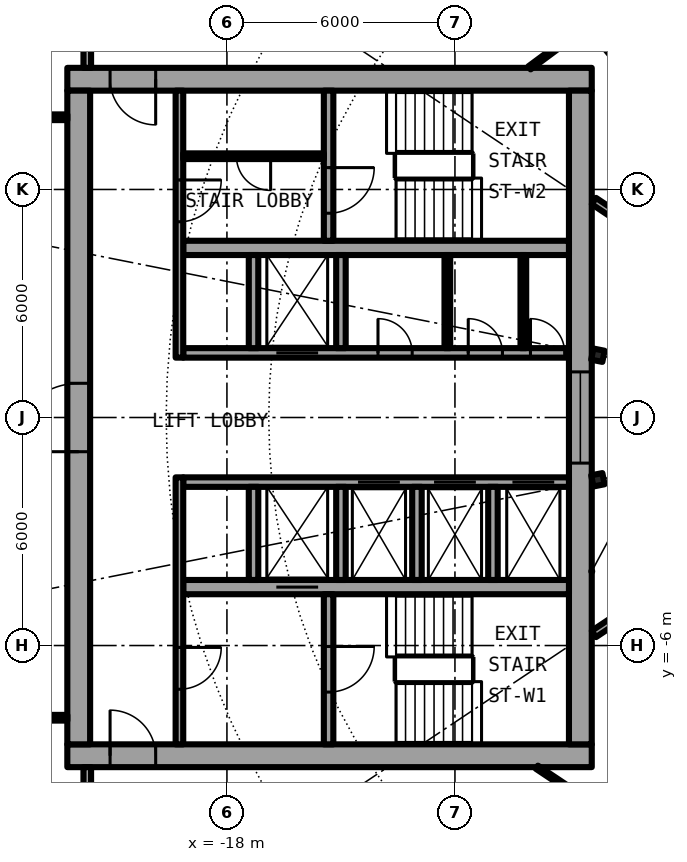
"""IFC4 building model, lengths in metres.
Left out: names, types, materials, properties, quantities, classifications, styles, units other than length and angle.
Written with IfcOpenShell. Run it as: python <this file> out.ifc"""

import sys

from ifc_helpers import new_model, si_unit, direction, frame, frame_2d, origin, origin_2d, place, context, subcontext, project, spatial, rectangle, i_section, extrude, element, fill, save


model = new_model("IFC4")
c1 = context("Model", 3, precision=1e-05, world=origin(), true_north=direction((0.0, 1.0)))
c2 = subcontext(c1, "Body", "Model", "MODEL_VIEW")
j1 = project(units=[si_unit("LENGTHUNIT", "METRE"), si_unit("PLANEANGLEUNIT", "RADIAN")], contexts=[c1])
p1 = place(None, origin())
s1 = spatial("IfcSite", under=j1, at=p1, CompositionType="ELEMENT")
p2 = place(p1, origin())
s2 = spatial("IfcBuilding", under=s1, at=p2, CompositionType="ELEMENT")
p3 = place(p2, frame((0.0, 0.0, 123.85)))
s3 = spatial("IfcBuildingStorey", under=s2, at=p3, CompositionType="ELEMENT", Elevation=123.85)
for number, where, z_axis, x_axis in (
    (1, (-8.239, 1.639, 0.0), (0.0, 0.0, 1.0), (-0.981, 0.195, 0.0)),
    (2, (-8.239, -1.639, 0.0), (0.0, 0.0, 1.0), (-0.981, -0.195, 0.0)),
):
    element("IfcColumn", number, at=place(p3, frame(where, z_axis=z_axis, x_axis=x_axis)), inside=s3, PredefinedType="COLUMN", context=c2, shape_type="SweptSolid", body=[
        extrude(i_section(OverallWidth=0.3, OverallDepth=0.3, WebThickness=0.011, FlangeThickness=0.019, FilletRadius=0.027, at=origin_2d()), origin(), (0.0, 0.0, 1.0), 3.05),
    ])
p4 = place(p3, frame((-22.2, -8.9, 0.0), z_axis=(0.0, 0.0, 1.0), x_axis=(1.0, 0.0, 0.0)))
e3 = element("IfcWall", 3, at=p4, inside=s3, PredefinedType="SHEAR", context=c2, shape_type="SweptSolid", body=[
    extrude(rectangle(XDim=13.8, YDim=0.6, at=frame_2d((6.9, 0.0))), origin(), (0.0, 0.0, 1.0), 3.05),
])
p5 = place(p4, frame((1.125, 0.0, 0.0)))
e4 = element("IfcOpeningElement", 4, at=p5, cuts=e3, PredefinedType="OPENING", context=c2, shape_type="SweptSolid", body=[
    extrude(rectangle(XDim=1.2, YDim=2.3, at=frame_2d((0.6, 1.15))), frame((0.0, 0.31, 0.0), z_axis=(0.0, -1.0, 0.0), x_axis=(1.0, 0.0, 0.0)), (0.0, 0.0, 1.0), 0.62),
])
p6 = place(p3, frame((-8.4, 8.9, 0.0), z_axis=(0.0, 0.0, 1.0), x_axis=(-1.0, 0.0, 0.0)))
e5 = element("IfcWall", 5, at=p6, inside=s3, PredefinedType="SHEAR", context=c2, shape_type="SweptSolid", body=[
    extrude(rectangle(XDim=13.8, YDim=0.6, at=frame_2d((6.9, 0.0))), origin(), (0.0, 0.0, 1.0), 3.05),
])
p7 = place(p6, frame((11.475, 0.0, 0.0)))
e6 = element("IfcOpeningElement", 6, at=p7, cuts=e5, PredefinedType="OPENING", context=c2, shape_type="SweptSolid", body=[
    extrude(rectangle(XDim=1.2, YDim=2.3, at=frame_2d((0.6, 1.15))), frame((0.0, 0.31, 0.0), z_axis=(0.0, -1.0, 0.0), x_axis=(1.0, 0.0, 0.0)), (0.0, 0.0, 1.0), 0.62),
])
p8 = place(p3, frame((-21.9, -8.6, 0.0), z_axis=(0.0, 0.0, 1.0), x_axis=(0.0, 1.0, 0.0)))
e7 = element("IfcWall", 7, at=p8, inside=s3, PredefinedType="SHEAR", context=c2, shape_type="SweptSolid", body=[
    extrude(rectangle(XDim=17.2, YDim=0.6, at=frame_2d((8.6, 0.0))), origin(), (0.0, 0.0, 1.0), 3.05),
])
p9 = place(p8, frame((7.7, 0.0, 0.0)))
e8 = element("IfcOpeningElement", 8, at=p9, cuts=e7, PredefinedType="OPENING", context=c2, shape_type="SweptSolid", body=[
    extrude(rectangle(XDim=1.8, YDim=2.3, at=frame_2d((0.9, 1.15))), frame((0.0, 0.31, 0.0), z_axis=(0.0, -1.0, 0.0), x_axis=(1.0, 0.0, 0.0)), (0.0, 0.0, 1.0), 0.62),
])
p10 = place(p3, frame((-8.7, 8.6, 0.0), z_axis=(0.0, 0.0, 1.0), x_axis=(0.0, -1.0, 0.0)))
e9 = element("IfcWall", 9, at=p10, inside=s3, PredefinedType="SHEAR", context=c2, shape_type="SweptSolid", body=[
    extrude(rectangle(XDim=17.2, YDim=0.6, at=frame_2d((8.6, 0.0))), origin(), (0.0, 0.0, 1.0), 3.05),
])
p11 = place(p10, frame((7.4, 0.0, 0.1)))
e10 = element("IfcOpeningElement", 10, at=p11, cuts=e9, PredefinedType="OPENING", context=c2, shape_type="SweptSolid", body=[
    extrude(rectangle(XDim=2.4, YDim=2.2, at=frame_2d((1.2, 1.1))), frame((0.0, 0.31, 0.0), z_axis=(0.0, -1.0, 0.0), x_axis=(1.0, 0.0, 0.0)), (0.0, 0.0, 1.0), 0.62),
])
p12 = place(p3, frame((-9.0, -1.7, 0.0), z_axis=(0.0, 0.0, 1.0), x_axis=(-1.0, 0.0, 0.0)))
e11 = element("IfcWall", 11, at=p12, inside=s3, PredefinedType="SHEAR", context=c2, shape_type="SweptSolid", body=[
    extrude(rectangle(XDim=10.15, YDim=0.25, at=frame_2d((5.075, 0.0))), origin(), (0.0, 0.0, 1.0), 3.05),
])
p13 = place(p12, frame((0.387, 0.0, 0.0)))
e12 = element("IfcOpeningElement", 12, at=p13, cuts=e11, PredefinedType="OPENING", context=c2, shape_type="SweptSolid", body=[
    extrude(rectangle(XDim=1.1, YDim=2.3, at=frame_2d((0.55, 1.15))), frame((0.0, 0.135, 0.0), z_axis=(0.0, -1.0, 0.0), x_axis=(1.0, 0.0, 0.0)), (0.0, 0.0, 1.0), 0.27),
])
p14 = place(p12, frame((2.45, 0.0, 0.0)))
e13 = element("IfcOpeningElement", 13, at=p14, cuts=e11, PredefinedType="OPENING", context=c2, shape_type="SweptSolid", body=[
    extrude(rectangle(XDim=1.1, YDim=2.3, at=frame_2d((0.55, 1.15))), frame((0.0, 0.135, 0.0), z_axis=(0.0, -1.0, 0.0), x_axis=(1.0, 0.0, 0.0)), (0.0, 0.0, 1.0), 0.27),
])
p15 = place(p12, frame((4.45, 0.0, 0.0)))
e14 = element("IfcOpeningElement", 14, at=p15, cuts=e11, PredefinedType="OPENING", context=c2, shape_type="SweptSolid", body=[
    extrude(rectangle(XDim=1.1, YDim=2.3, at=frame_2d((0.55, 1.15))), frame((0.0, 0.135, 0.0), z_axis=(0.0, -1.0, 0.0), x_axis=(1.0, 0.0, 0.0)), (0.0, 0.0, 1.0), 0.27),
])
p16 = place(p3, frame((-9.0, -4.462, 0.0), z_axis=(0.0, 0.0, 1.0), x_axis=(-1.0, 0.0, 0.0)))
e15 = element("IfcWall", 15, at=p16, inside=s3, PredefinedType="SHEAR", context=c2, shape_type="SweptSolid", body=[
    extrude(rectangle(XDim=10.15, YDim=0.375, at=frame_2d((5.075, 0.0))), origin(), (0.0, 0.0, 1.0), 3.05),
])
p17 = place(p16, frame((6.6, 0.0, 0.0)))
e16 = element("IfcOpeningElement", 16, at=p17, cuts=e15, PredefinedType="OPENING", context=c2, shape_type="SweptSolid", body=[
    extrude(rectangle(XDim=1.1, YDim=2.3, at=frame_2d((0.55, 1.15))), frame((0.0, 0.198, 0.0), z_axis=(0.0, -1.0, 0.0), x_axis=(1.0, 0.0, 0.0)), (0.0, 0.0, 1.0), 0.395),
])
p18 = place(p3, frame((-15.325, -4.65, 0.0), z_axis=(0.0, 0.0, 1.0), x_axis=(0.0, -1.0, 0.0)))
e17 = element("IfcWall", 17, at=p18, inside=s3, PredefinedType="SHEAR", context=c2, shape_type="SweptSolid", body=[
    extrude(rectangle(XDim=3.95, YDim=0.25, at=frame_2d((1.975, 0.0))), origin(), (0.0, 0.0, 1.0), 3.05),
])
p19 = place(p18, frame((1.375, 0.0, 0.0)))
e18 = element("IfcOpeningElement", 18, at=p19, cuts=e17, PredefinedType="OPENING", context=c2, shape_type="SweptSolid", body=[
    extrude(rectangle(XDim=1.2, YDim=2.3, at=frame_2d((0.6, 1.15))), frame((0.0, 0.135, 0.0), z_axis=(0.0, -1.0, 0.0), x_axis=(1.0, 0.0, 0.0)), (0.0, 0.0, 1.0), 0.27),
])
for number, where, z_axis, x_axis in (
    (19, (-15.0, -1.825, 0.0), (0.0, 0.0, 1.0), (0.0, -1.0, 0.0)),
    (20, (-17.3, -1.825, 0.0), (0.0, 0.0, 1.0), (0.0, -1.0, 0.0)),
):
    element("IfcWall", number, at=place(p3, frame(where, z_axis=z_axis, x_axis=x_axis)), inside=s3, PredefinedType="SOLIDWALL", context=c2, shape_type="SweptSolid", body=[
        extrude(rectangle(XDim=2.45, YDim=0.25, at=frame_2d((1.225, 0.0))), origin(), (0.0, 0.0, 1.0), 2.7),
    ])
p20 = place(p3, frame((-19.25, -1.575, 0.0), z_axis=(0.0, 0.0, 1.0), x_axis=(0.0, -1.0, 0.0)))
e21 = element("IfcWall", 21, at=p20, inside=s3, PredefinedType="SOLIDWALL", context=c2, shape_type="SweptSolid", body=[
    extrude(rectangle(XDim=7.025, YDim=0.2, at=frame_2d((3.513, 0.0))), origin(), (0.0, 0.0, 1.0), 2.7),
])
p21 = place(p20, frame((4.475, 0.0, 0.0)))
e22 = element("IfcOpeningElement", 22, at=p21, cuts=e21, PredefinedType="OPENING", context=c2, shape_type="SweptSolid", body=[
    extrude(rectangle(XDim=1.1, YDim=2.3, at=frame_2d((0.55, 1.15))), frame((0.0, 0.11, 0.0), z_axis=(0.0, -1.0, 0.0), x_axis=(1.0, 0.0, 0.0)), (0.0, 0.0, 1.0), 0.22),
])
p22 = place(p3, frame((-19.15, 1.7, 0.0), z_axis=(0.0, 0.0, 1.0), x_axis=(1.0, 0.0, 0.0)))
e23 = element("IfcWall", 23, at=p22, inside=s3, PredefinedType="SHEAR", context=c2, shape_type="SweptSolid", body=[
    extrude(rectangle(XDim=10.15, YDim=0.25, at=frame_2d((5.075, 0.0))), origin(), (0.0, 0.0, 1.0), 3.05),
])
p23 = place(p22, frame((2.45, 0.0, 0.0)))
e24 = element("IfcOpeningElement", 24, at=p23, cuts=e23, PredefinedType="OPENING", context=c2, shape_type="SweptSolid", body=[
    extrude(rectangle(XDim=1.1, YDim=2.3, at=frame_2d((0.55, 1.15))), frame((0.0, 0.135, 0.0), z_axis=(0.0, -1.0, 0.0), x_axis=(1.0, 0.0, 0.0)), (0.0, 0.0, 1.0), 0.27),
])
p24 = place(p22, frame((9.137, 0.0, 0.0)))
e25 = element("IfcOpeningElement", 25, at=p24, cuts=e23, PredefinedType="OPENING", context=c2, shape_type="SweptSolid", body=[
    extrude(rectangle(XDim=0.9, YDim=2.3, at=frame_2d((0.45, 1.15))), frame((0.0, 0.135, 0.0), z_axis=(0.0, -1.0, 0.0), x_axis=(1.0, 0.0, 0.0)), (0.0, 0.0, 1.0), 0.27),
])
p25 = place(p22, frame((7.5, 0.0, 0.0)))
e26 = element("IfcOpeningElement", 26, at=p25, cuts=e23, PredefinedType="OPENING", context=c2, shape_type="SweptSolid", body=[
    extrude(rectangle(XDim=0.9, YDim=2.3, at=frame_2d((0.45, 1.15))), frame((0.0, 0.135, 0.0), z_axis=(0.0, -1.0, 0.0), x_axis=(1.0, 0.0, 0.0)), (0.0, 0.0, 1.0), 0.27),
])
p26 = place(p22, frame((5.125, 0.0, 0.0)))
e27 = element("IfcOpeningElement", 27, at=p26, cuts=e23, PredefinedType="OPENING", context=c2, shape_type="SweptSolid", body=[
    extrude(rectangle(XDim=0.9, YDim=2.3, at=frame_2d((0.45, 1.15))), frame((0.0, 0.135, 0.0), z_axis=(0.0, -1.0, 0.0), x_axis=(1.0, 0.0, 0.0)), (0.0, 0.0, 1.0), 0.27),
])
p27 = place(p3, frame((-9.0, 4.462, 0.0), z_axis=(0.0, 0.0, 1.0), x_axis=(-1.0, 0.0, 0.0)))
e28 = element("IfcWall", 28, at=p27, inside=s3, PredefinedType="SHEAR", context=c2, shape_type="SweptSolid", body=[
    extrude(rectangle(XDim=10.15, YDim=0.375, at=frame_2d((5.075, 0.0))), origin(), (0.0, 0.0, 1.0), 3.05),
])
p28 = place(p3, frame((-15.325, 8.6, 0.0), z_axis=(0.0, 0.0, 1.0), x_axis=(0.0, -1.0, 0.0)))
e29 = element("IfcWall", 29, at=p28, inside=s3, PredefinedType="SHEAR", context=c2, shape_type="SweptSolid", body=[
    extrude(rectangle(XDim=3.95, YDim=0.25, at=frame_2d((1.975, 0.0))), origin(), (0.0, 0.0, 1.0), 3.05),
])
p29 = place(p28, frame((2.025, 0.0, 0.0)))
e30 = element("IfcOpeningElement", 30, at=p29, cuts=e29, PredefinedType="OPENING", context=c2, shape_type="SweptSolid", body=[
    extrude(rectangle(XDim=1.2, YDim=2.3, at=frame_2d((0.6, 1.15))), frame((0.0, 0.135, 0.0), z_axis=(0.0, -1.0, 0.0), x_axis=(1.0, 0.0, 0.0)), (0.0, 0.0, 1.0), 0.27),
])
for number, where, z_axis, x_axis in (
    (31, (-15.0, 1.825, 0.0), (0.0, 0.0, 1.0), (0.0, 1.0, 0.0)),
    (32, (-17.3, 1.825, 0.0), (0.0, 0.0, 1.0), (0.0, 1.0, 0.0)),
):
    element("IfcWall", number, at=place(p3, frame(where, z_axis=z_axis, x_axis=x_axis)), inside=s3, PredefinedType="SOLIDWALL", context=c2, shape_type="SweptSolid", body=[
        extrude(rectangle(XDim=2.45, YDim=0.25, at=frame_2d((1.225, 0.0))), origin(), (0.0, 0.0, 1.0), 2.7),
    ])
p30 = place(p3, frame((-19.25, 8.6, 0.0), z_axis=(0.0, 0.0, 1.0), x_axis=(0.0, -1.0, 0.0)))
e33 = element("IfcWall", 33, at=p30, inside=s3, PredefinedType="SOLIDWALL", context=c2, shape_type="SweptSolid", body=[
    extrude(rectangle(XDim=7.025, YDim=0.2, at=frame_2d((3.513, 0.0))), origin(), (0.0, 0.0, 1.0), 2.7),
])
p31 = place(p30, frame((2.35, 0.0, 0.0)))
e34 = element("IfcOpeningElement", 34, at=p31, cuts=e33, PredefinedType="OPENING", context=c2, shape_type="SweptSolid", body=[
    extrude(rectangle(XDim=1.1, YDim=2.3, at=frame_2d((0.55, 1.15))), frame((0.0, 0.11, 0.0), z_axis=(0.0, -1.0, 0.0), x_axis=(1.0, 0.0, 0.0)), (0.0, 0.0, 1.0), 0.22),
])
for number, where, z_axis, x_axis in (
    (35, (-11.0, -1.825, 0.0), (0.0, 0.0, 1.0), (0.0, -1.0, 0.0)),
    (36, (-13.0, -1.825, 0.0), (0.0, 0.0, 1.0), (0.0, -1.0, 0.0)),
):
    element("IfcWall", number, at=place(p3, frame(where, z_axis=z_axis, x_axis=x_axis)), inside=s3, PredefinedType="SOLIDWALL", context=c2, shape_type="SweptSolid", body=[
        extrude(rectangle(XDim=2.45, YDim=0.25, at=frame_2d((1.225, 0.0))), origin(), (0.0, 0.0, 1.0), 2.7),
    ])
for number, where, z_axis, x_axis in (
    (37, (-10.2, 1.825, 0.0), (0.0, 0.0, 1.0), (0.0, 1.0, 0.0)),
    (38, (-12.2, 1.825, 0.0), (0.0, 0.0, 1.0), (0.0, 1.0, 0.0)),
):
    element("IfcWall", number, at=place(p3, frame(where, z_axis=z_axis, x_axis=x_axis)), inside=s3, PredefinedType="PARTITIONING", context=c2, shape_type="SweptSolid", body=[
        extrude(rectangle(XDim=2.45, YDim=0.15, at=frame_2d((1.225, 0.0))), origin(), (0.0, 0.0, 1.0), 2.7),
    ])
p32 = place(p3, frame((-15.45, 6.875, 0.0), z_axis=(0.0, 0.0, 1.0), x_axis=(-1.0, 0.0, 0.0)))
e39 = element("IfcWall", 39, at=p32, inside=s3, PredefinedType="PARTITIONING", context=c2, shape_type="SweptSolid", body=[
    extrude(rectangle(XDim=3.7, YDim=0.15, at=frame_2d((1.85, 0.0))), origin(), (0.0, 0.0, 1.0), 2.7),
])
p33 = place(p32, frame((1.4, 0.0, 0.0)))
e40 = element("IfcOpeningElement", 40, at=p33, cuts=e39, PredefinedType="OPENING", context=c2, shape_type="SweptSolid", body=[
    extrude(rectangle(XDim=0.9, YDim=2.3, at=frame_2d((0.45, 1.15))), frame((0.0, 0.085, 0.0), z_axis=(0.0, -1.0, 0.0), x_axis=(1.0, 0.0, 0.0)), (0.0, 0.0, 1.0), 0.17),
])
for number, where, z_axis, x_axis in (
    (41, (-22.2, 7.9, 0.0), (0.0, 0.0, 1.0), (-1.0, 0.0, 0.0)),
    (42, (-22.2, -7.9, 0.0), (0.0, 0.0, 1.0), (-1.0, 0.0, 0.0)),
):
    element("IfcWall", number, at=place(p3, frame(where, z_axis=z_axis, x_axis=x_axis)), inside=s3, PredefinedType="PARTITIONING", context=c2, shape_type="SweptSolid", body=[
        extrude(rectangle(XDim=2.74, YDim=0.15, at=frame_2d((1.37, 0.0))), origin(), (0.0, 0.0, 1.0), 2.7),
    ])
p34 = place(p3, frame((-9.844, -9.202, 0.0), z_axis=(0.0, 0.0, 1.0), x_axis=(0.831617979783, -0.555348121183, 0.0)))
e43 = element("IfcWall", 43, at=p34, inside=s3, PredefinedType="PARTITIONING", context=c2, shape_type="SweptSolid", body=[
    extrude(rectangle(XDim=4.434, YDim=0.1, at=frame_2d((2.217, 0.0))), origin(), (0.0, 0.0, 1.0), 2.7),
])
p35 = place(p3, frame((-6.513, -4.472, 0.0), z_axis=(0.0, 0.0, 1.0), x_axis=(-0.831333375071, -0.555774072347, 0.0)))
e44 = element("IfcWall", 44, at=p35, inside=s3, PredefinedType="PARTITIONING", context=c2, shape_type="SweptSolid", body=[
    extrude(rectangle(XDim=2.203, YDim=0.2, at=frame_2d((1.101, 0.0))), origin(), (0.0, 0.0, 1.0), 2.7),
])
p36 = place(p3, frame((-10.132, 12.296, 0.0), z_axis=(0.0, 0.0, 1.0), x_axis=(0.635976043025, -0.771708800454, 0.0)))
e45 = element("IfcWall", 45, at=p36, inside=s3, PredefinedType="PARTITIONING", context=c2, shape_type="SweptSolid", body=[
    extrude(rectangle(XDim=8.213, YDim=0.1, at=frame_2d((4.106, 0.0))), origin(), (0.0, 0.0, 1.0), 2.7),
])
p37 = place(p36, frame((0.823, 0.0, 0.0)))
e46 = element("IfcOpeningElement", 46, at=p37, cuts=e45, PredefinedType="OPENING", context=c2, shape_type="SweptSolid", body=[
    extrude(rectangle(XDim=0.9, YDim=2.3, at=frame_2d((0.45, 1.15))), frame((0.0, 0.06, 0.0), z_axis=(0.0, -1.0, 0.0), x_axis=(1.0, 0.0, 0.0)), (0.0, 0.0, 1.0), 0.12),
])
p38 = place(p36, frame((4.929, 0.0, 0.0)))
e47 = element("IfcOpeningElement", 47, at=p38, cuts=e45, PredefinedType="OPENING", context=c2, shape_type="SweptSolid", body=[
    extrude(rectangle(XDim=0.9, YDim=2.3, at=frame_2d((0.45, 1.15))), frame((0.0, 0.06, 0.0), z_axis=(0.0, -1.0, 0.0), x_axis=(1.0, 0.0, 0.0)), (0.0, 0.0, 1.0), 0.12),
])
p39 = place(p3, frame((-6.513, 4.472, 0.0), z_axis=(0.0, 0.0, 1.0), x_axis=(-0.831333375071, 0.555774072347, 0.0)))
e48 = element("IfcWall", 48, at=p39, inside=s3, PredefinedType="PARTITIONING", context=c2, shape_type="SweptSolid", body=[
    extrude(rectangle(XDim=2.203, YDim=0.2, at=frame_2d((1.101, 0.0))), origin(), (0.0, 0.0, 1.0), 2.7),
])
p40 = place(p3, frame((-10.039, 9.2, 0.0), z_axis=(0.0, 0.0, 1.0), x_axis=(0.803149591038, 0.595777420196, 0.0)))
e49 = element("IfcWall", 49, at=p40, inside=s3, PredefinedType="PARTITIONING", context=c2, shape_type="SweptSolid", body=[
    extrude(rectangle(XDim=1.9, YDim=0.1, at=frame_2d((0.95, 0.0))), origin(), (0.0, 0.0, 1.0), 2.7),
])
for number, where, z_axis, x_axis in (
    (50, (-21.675, -10.9, 0.0), (0.0, 0.0, 1.0), (0.0, 1.0, 0.0)),
    (51, (-21.675, 9.2, 0.0), (0.0, 0.0, 1.0), (0.0, 1.0, 0.0)),
):
    element("IfcWall", number, at=place(p3, frame(where, z_axis=z_axis, x_axis=x_axis)), inside=s3, PredefinedType="PARTITIONING", context=c2, shape_type="SweptSolid", body=[
        extrude(rectangle(XDim=1.7, YDim=0.2, at=frame_2d((0.85, 0.0))), origin(), (0.0, 0.0, 1.0), 2.7),
    ])
p41 = place(p13, origin())
e52 = element("IfcDoor", 52, at=p41, inside=s3, OperationType="DOUBLE_DOOR_SLIDING", PredefinedType="DOOR", context=c2, shape_type="SweptSolid", body=[
    extrude(rectangle(XDim=1.1, YDim=2.3, at=frame_2d((0.55, 1.15))), frame((0.0, 0.025, 0.0), z_axis=(0.0, -1.0, 0.0), x_axis=(1.0, 0.0, 0.0)), (0.0, 0.0, 1.0), 0.05),
])
fill(e12, e52)
p42 = place(p14, origin())
e53 = element("IfcDoor", 53, at=p42, inside=s3, OperationType="DOUBLE_DOOR_SLIDING", PredefinedType="DOOR", context=c2, shape_type="SweptSolid", body=[
    extrude(rectangle(XDim=1.1, YDim=2.3, at=frame_2d((0.55, 1.15))), frame((0.0, 0.025, 0.0), z_axis=(0.0, -1.0, 0.0), x_axis=(1.0, 0.0, 0.0)), (0.0, 0.0, 1.0), 0.05),
])
fill(e13, e53)
p43 = place(p15, origin())
e54 = element("IfcDoor", 54, at=p43, inside=s3, OperationType="DOUBLE_DOOR_SLIDING", PredefinedType="DOOR", context=c2, shape_type="SweptSolid", body=[
    extrude(rectangle(XDim=1.1, YDim=2.3, at=frame_2d((0.55, 1.15))), frame((0.0, 0.025, 0.0), z_axis=(0.0, -1.0, 0.0), x_axis=(1.0, 0.0, 0.0)), (0.0, 0.0, 1.0), 0.05),
])
fill(e14, e54)
p44 = place(p17, origin())
e55 = element("IfcDoor", 55, at=p44, inside=s3, OperationType="DOUBLE_DOOR_SLIDING", PredefinedType="DOOR", context=c2, shape_type="SweptSolid", body=[
    extrude(rectangle(XDim=1.1, YDim=2.3, at=frame_2d((0.55, 1.15))), frame((0.0, 0.025, 0.0), z_axis=(0.0, -1.0, 0.0), x_axis=(1.0, 0.0, 0.0)), (0.0, 0.0, 1.0), 0.05),
])
fill(e16, e55)
p45 = place(p23, origin())
e56 = element("IfcDoor", 56, at=p45, inside=s3, OperationType="DOUBLE_DOOR_SLIDING", PredefinedType="DOOR", context=c2, shape_type="SweptSolid", body=[
    extrude(rectangle(XDim=1.1, YDim=2.3, at=frame_2d((0.55, 1.15))), frame((0.0, 0.025, 0.0), z_axis=(0.0, -1.0, 0.0), x_axis=(1.0, 0.0, 0.0)), (0.0, 0.0, 1.0), 0.05),
])
fill(e24, e56)
p46 = place(p24, origin())
e57 = element("IfcDoor", 57, at=p46, inside=s3, OperationType="SINGLE_SWING_LEFT", PredefinedType="DOOR", context=c2, shape_type="SweptSolid", body=[
    extrude(rectangle(XDim=0.9, YDim=2.3, at=frame_2d((0.45, 1.15))), frame((0.0, 0.025, 0.0), z_axis=(0.0, -1.0, 0.0), x_axis=(1.0, 0.0, 0.0)), (0.0, 0.0, 1.0), 0.05),
])
fill(e25, e57)
p47 = place(p25, origin())
e58 = element("IfcDoor", 58, at=p47, inside=s3, OperationType="SINGLE_SWING_LEFT", PredefinedType="DOOR", context=c2, shape_type="SweptSolid", body=[
    extrude(rectangle(XDim=0.9, YDim=2.3, at=frame_2d((0.45, 1.15))), frame((0.0, 0.025, 0.0), z_axis=(0.0, -1.0, 0.0), x_axis=(1.0, 0.0, 0.0)), (0.0, 0.0, 1.0), 0.05),
])
fill(e26, e58)
p48 = place(p26, origin())
e59 = element("IfcDoor", 59, at=p48, inside=s3, OperationType="SINGLE_SWING_LEFT", PredefinedType="DOOR", context=c2, shape_type="SweptSolid", body=[
    extrude(rectangle(XDim=0.9, YDim=2.3, at=frame_2d((0.45, 1.15))), frame((0.0, 0.025, 0.0), z_axis=(0.0, -1.0, 0.0), x_axis=(1.0, 0.0, 0.0)), (0.0, 0.0, 1.0), 0.05),
])
fill(e27, e59)
p49 = place(p33, origin())
e60 = element("IfcDoor", 60, at=p49, inside=s3, OperationType="SINGLE_SWING_LEFT", PredefinedType="DOOR", context=c2, shape_type="SweptSolid", body=[
    extrude(rectangle(XDim=0.9, YDim=2.3, at=frame_2d((0.45, 1.15))), frame((0.0, 0.025, 0.0), z_axis=(0.0, -1.0, 0.0), x_axis=(1.0, 0.0, 0.0)), (0.0, 0.0, 1.0), 0.05),
])
fill(e40, e60)
p50 = place(p19, origin())
e61 = element("IfcDoor", 61, at=p50, inside=s3, OperationType="SINGLE_SWING_LEFT", PredefinedType="DOOR", context=c2, shape_type="SweptSolid", body=[
    extrude(rectangle(XDim=1.2, YDim=2.3, at=frame_2d((0.6, 1.15))), frame((0.0, 0.025, 0.0), z_axis=(0.0, -1.0, 0.0), x_axis=(1.0, 0.0, 0.0)), (0.0, 0.0, 1.0), 0.05),
])
fill(e18, e61)
p51 = place(p29, origin())
e62 = element("IfcDoor", 62, at=p51, inside=s3, OperationType="SINGLE_SWING_LEFT", PredefinedType="DOOR", context=c2, shape_type="SweptSolid", body=[
    extrude(rectangle(XDim=1.2, YDim=2.3, at=frame_2d((0.6, 1.15))), frame((0.0, 0.025, 0.0), z_axis=(0.0, -1.0, 0.0), x_axis=(1.0, 0.0, 0.0)), (0.0, 0.0, 1.0), 0.05),
])
fill(e30, e62)
p52 = place(p21, origin())
e63 = element("IfcDoor", 63, at=p52, inside=s3, OperationType="SINGLE_SWING_LEFT", PredefinedType="DOOR", context=c2, shape_type="SweptSolid", body=[
    extrude(rectangle(XDim=1.1, YDim=2.3, at=frame_2d((0.55, 1.15))), frame((0.0, 0.025, 0.0), z_axis=(0.0, -1.0, 0.0), x_axis=(1.0, 0.0, 0.0)), (0.0, 0.0, 1.0), 0.05),
])
fill(e22, e63)
p53 = place(p31, origin())
e64 = element("IfcDoor", 64, at=p53, inside=s3, OperationType="SINGLE_SWING_RIGHT", PredefinedType="DOOR", context=c2, shape_type="SweptSolid", body=[
    extrude(rectangle(XDim=1.1, YDim=2.3, at=frame_2d((0.55, 1.15))), frame((0.0, 0.025, 0.0), z_axis=(0.0, -1.0, 0.0), x_axis=(1.0, 0.0, 0.0)), (0.0, 0.0, 1.0), 0.05),
])
fill(e34, e64)
p54 = place(p5, origin())
e65 = element("IfcDoor", 65, at=p54, inside=s3, OperationType="SINGLE_SWING_RIGHT", PredefinedType="DOOR", context=c2, shape_type="SweptSolid", body=[
    extrude(rectangle(XDim=1.2, YDim=2.3, at=frame_2d((0.6, 1.15))), frame((0.0, 0.025, 0.0), z_axis=(0.0, -1.0, 0.0), x_axis=(1.0, 0.0, 0.0)), (0.0, 0.0, 1.0), 0.05),
])
fill(e4, e65)
p55 = place(p7, origin())
e66 = element("IfcDoor", 66, at=p55, inside=s3, OperationType="SINGLE_SWING_LEFT", PredefinedType="DOOR", context=c2, shape_type="SweptSolid", body=[
    extrude(rectangle(XDim=1.2, YDim=2.3, at=frame_2d((0.6, 1.15))), frame((0.0, 0.025, 0.0), z_axis=(0.0, -1.0, 0.0), x_axis=(1.0, 0.0, 0.0)), (0.0, 0.0, 1.0), 0.05),
])
fill(e6, e66)
p56 = place(p9, origin())
e67 = element("IfcDoor", 67, at=p56, inside=s3, OperationType="SINGLE_SWING_LEFT", PredefinedType="DOOR", context=c2, shape_type="SweptSolid", body=[
    extrude(rectangle(XDim=1.8, YDim=2.3, at=frame_2d((0.9, 1.15))), frame((0.0, 0.025, 0.0), z_axis=(0.0, -1.0, 0.0), x_axis=(1.0, 0.0, 0.0)), (0.0, 0.0, 1.0), 0.05),
])
fill(e8, e67)
p57 = place(p11, origin())
e68 = element("IfcWindow", 68, at=p57, inside=s3, PartitioningType="SINGLE_PANEL", PredefinedType="WINDOW", context=c2, shape_type="SweptSolid", body=[
    extrude(rectangle(XDim=2.4, YDim=2.2, at=frame_2d((1.2, 1.1))), frame((0.0, 0.03, 0.0), z_axis=(0.0, -1.0, 0.0), x_axis=(1.0, 0.0, 0.0)), (0.0, 0.0, 1.0), 0.06),
])
fill(e10, e68)
save(model, sys.argv[1])
